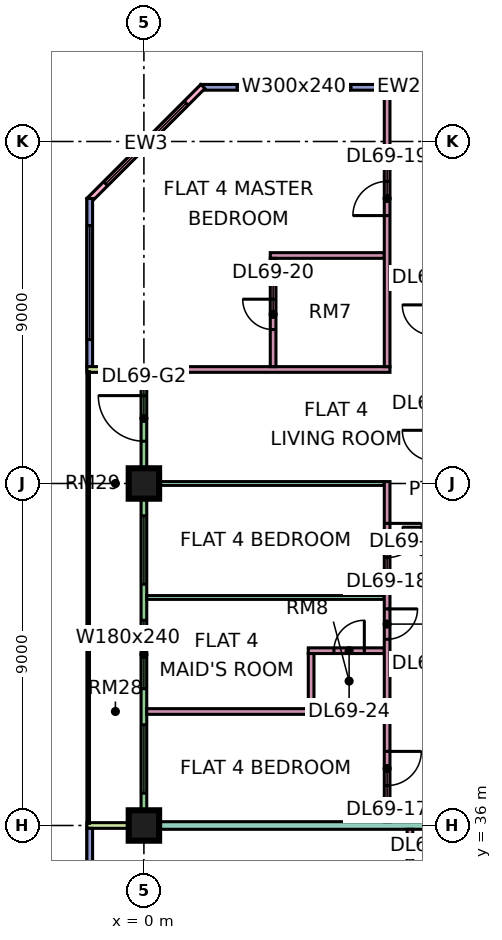
"""IFC4 building model, lengths in metres.
Left out: names, types, materials, properties, quantities, classifications, styles, units other than length and angle.
Written with IfcOpenShell. Run it as: python <this file> out.ifc"""

import sys

from ifc_helpers import new_model, si_unit, direction, frame, frame_2d, origin, origin_2d, place, context, subcontext, project, spatial, rectangle, extrude, element, fill, save


model = new_model("IFC4")
c1 = context("Model", 3, precision=1e-05, world=origin(), true_north=direction((0.0, 1.0)))
c2 = subcontext(c1, "Body", "Model", "MODEL_VIEW")
j1 = project(units=[si_unit("LENGTHUNIT", "METRE"), si_unit("PLANEANGLEUNIT", "RADIAN")], contexts=[c1])
p1 = place(None, origin())
s1 = spatial("IfcSite", under=j1, at=p1, CompositionType="ELEMENT")
p2 = place(p1, origin())
s2 = spatial("IfcBuilding", under=s1, at=p2, CompositionType="ELEMENT")
p3 = place(p2, frame((0.0, 0.0, 295.9)))
s3 = spatial("IfcBuildingStorey", under=s2, at=p3, CompositionType="ELEMENT", Elevation=295.9)
p4 = place(p3, frame((0.0, 36.0, 0.0), z_axis=(0.0, 0.0, 1.0), x_axis=(1.0, 0.0, 0.0)))
e1 = element("IfcColumn", 1, at=p4, inside=s3, PredefinedType="COLUMN", context=c2, shape_type="SweptSolid", body=[
    extrude(rectangle(XDim=0.8, YDim=0.8, at=origin_2d()), origin(), (0.0, 0.0, 1.0), 3.75),
])
p5 = place(p3, frame((0.0, 45.0, 0.0), z_axis=(0.0, 0.0, 1.0), x_axis=(1.0, 0.0, 0.0)))
e2 = element("IfcColumn", 2, at=p5, inside=s3, PredefinedType="COLUMN", context=c2, shape_type="SweptSolid", body=[
    extrude(rectangle(XDim=0.8, YDim=0.8, at=origin_2d()), origin(), (0.0, 0.0, 1.0), 3.75),
])
p6 = place(p3, frame((11.925, 55.425, 0.0), z_axis=(0.0, 0.0, 1.0), x_axis=(-1.0, 0.0, 0.0)))
e3 = element("IfcWall", 3, at=p6, inside=s3, PredefinedType="SOLIDWALL", context=c2, shape_type="SweptSolid", body=[
    extrude(rectangle(XDim=10.425, YDim=0.15, at=frame_2d((5.212, 0.0))), origin(), (0.0, 0.0, 1.0), 3.35),
])
p7 = place(p6, frame((1.262, 0.0, 0.45)))
e4 = element("IfcOpeningElement", 4, at=p7, cuts=e3, PredefinedType="OPENING", context=c2, shape_type="SweptSolid", body=[
    extrude(rectangle(XDim=3.0, YDim=2.4, at=frame_2d((1.5, 1.2))), frame((0.0, 0.085, 0.0), z_axis=(0.0, -1.0, 0.0), x_axis=(1.0, 0.0, 0.0)), (0.0, 0.0, 1.0), 0.17),
])
p8 = place(p6, frame((6.475, 0.0, 0.45)))
e5 = element("IfcOpeningElement", 5, at=p8, cuts=e3, PredefinedType="OPENING", context=c2, shape_type="SweptSolid", body=[
    extrude(rectangle(XDim=3.0, YDim=2.4, at=frame_2d((1.5, 1.2))), frame((0.0, 0.085, 0.0), z_axis=(0.0, -1.0, 0.0), x_axis=(1.0, 0.0, 0.0)), (0.0, 0.0, 1.0), 0.17),
])
p9 = place(p3, frame((1.553, 55.447, 0.0), z_axis=(0.0, 0.0, 1.0), x_axis=(-0.707106781187, -0.707106781187, 0.0)))
e6 = element("IfcWall", 6, at=p9, inside=s3, PredefinedType="SOLIDWALL", context=c2, shape_type="SweptSolid", body=[
    extrude(rectangle(XDim=4.243, YDim=0.15, at=frame_2d((2.121, 0.0))), origin(), (0.0, 0.0, 1.0), 3.35),
])
p10 = place(p9, frame((0.621, 0.0, 0.45)))
e7 = element("IfcOpeningElement", 7, at=p10, cuts=e6, PredefinedType="OPENING", context=c2, shape_type="SweptSolid", body=[
    extrude(rectangle(XDim=3.0, YDim=2.4, at=frame_2d((1.5, 1.2))), frame((0.0, 0.085, 0.0), z_axis=(0.0, -1.0, 0.0), x_axis=(1.0, 0.0, 0.0)), (0.0, 0.0, 1.0), 0.17),
])
p11 = place(p3, frame((-1.425, 52.5, 0.0), z_axis=(0.0, 0.0, 1.0), x_axis=(0.0, -1.0, 0.0)))
e8 = element("IfcWall", 8, at=p11, inside=s3, PredefinedType="SOLIDWALL", context=c2, shape_type="SweptSolid", body=[
    extrude(rectangle(XDim=4.425, YDim=0.15, at=frame_2d((2.212, 0.0))), origin(), (0.0, 0.0, 1.0), 3.35),
])
p12 = place(p11, frame((0.712, 0.0, 0.45)))
e9 = element("IfcOpeningElement", 9, at=p12, cuts=e8, PredefinedType="OPENING", context=c2, shape_type="SweptSolid", body=[
    extrude(rectangle(XDim=3.0, YDim=2.4, at=frame_2d((1.5, 1.2))), frame((0.0, 0.085, 0.0), z_axis=(0.0, -1.0, 0.0), x_axis=(1.0, 0.0, 0.0)), (0.0, 0.0, 1.0), 0.17),
])
p13 = place(p3, frame((0.0, 47.925, 0.0), z_axis=(0.0, 0.0, 1.0), x_axis=(0.0, -1.0, 0.0)))
e10 = element("IfcWall", 10, at=p13, inside=s3, PredefinedType="SOLIDWALL", context=c2, shape_type="SweptSolid", body=[
    extrude(rectangle(XDim=11.85, YDim=0.15, at=frame_2d((5.925, 0.0))), origin(), (0.0, 0.0, 1.0), 3.35),
])
p14 = place(p13, frame((0.613, 0.0, 0.0)))
e11 = element("IfcOpeningElement", 11, at=p14, cuts=e10, PredefinedType="OPENING", context=c2, shape_type="SweptSolid", body=[
    extrude(rectangle(XDim=1.2, YDim=2.4, at=frame_2d((0.6, 1.2))), frame((0.0, 0.085, 0.0), z_axis=(0.0, -1.0, 0.0), x_axis=(1.0, 0.0, 0.0)), (0.0, 0.0, 1.0), 0.17),
])
p15 = place(p13, frame((3.775, 0.0, 0.45)))
e12 = element("IfcOpeningElement", 12, at=p15, cuts=e10, PredefinedType="OPENING", context=c2, shape_type="SweptSolid", body=[
    extrude(rectangle(XDim=1.8, YDim=2.4, at=frame_2d((0.9, 1.2))), frame((0.0, 0.085, 0.0), z_axis=(0.0, -1.0, 0.0), x_axis=(1.0, 0.0, 0.0)), (0.0, 0.0, 1.0), 0.17),
])
p16 = place(p13, frame((6.525, 0.0, 0.45)))
e13 = element("IfcOpeningElement", 13, at=p16, cuts=e10, PredefinedType="OPENING", context=c2, shape_type="SweptSolid", body=[
    extrude(rectangle(XDim=1.8, YDim=2.4, at=frame_2d((0.9, 1.2))), frame((0.0, 0.085, 0.0), z_axis=(0.0, -1.0, 0.0), x_axis=(1.0, 0.0, 0.0)), (0.0, 0.0, 1.0), 0.17),
])
p17 = place(p13, frame((9.275, 0.0, 0.45)))
e14 = element("IfcOpeningElement", 14, at=p17, cuts=e10, PredefinedType="OPENING", context=c2, shape_type="SweptSolid", body=[
    extrude(rectangle(XDim=1.8, YDim=2.4, at=frame_2d((0.9, 1.2))), frame((0.0, 0.085, 0.0), z_axis=(0.0, -1.0, 0.0), x_axis=(1.0, 0.0, 0.0)), (0.0, 0.0, 1.0), 0.17),
])
for number, where, z_axis, x_axis in (
    (15, (-1.5, 48.0, 0.0), (0.0, 0.0, 1.0), (1.0, 0.0, 0.0)),
    (16, (-1.5, 36.0, 0.0), (0.0, 0.0, 1.0), (1.0, 0.0, 0.0)),
):
    element("IfcWall", number, at=place(p3, frame(where, z_axis=z_axis, x_axis=x_axis)), inside=s3, PredefinedType="SOLIDWALL", context=c2, shape_type="SweptSolid", body=[
        extrude(rectangle(XDim=1.5, YDim=0.15, at=frame_2d((0.75, 0.0))), origin(), (0.0, 0.0, 1.0), 3.35),
    ])
p18 = place(p3, frame((-1.425, 35.925, 0.0), z_axis=(0.0, 0.0, 1.0), x_axis=(0.0, -1.0, 0.0)))
e17 = element("IfcWall", 17, at=p18, inside=s3, PredefinedType="SOLIDWALL", context=c2, shape_type="SweptSolid", body=[
    extrude(rectangle(XDim=11.85, YDim=0.15, at=frame_2d((5.925, 0.0))), origin(), (0.0, 0.0, 1.0), 3.35),
])
p19 = place(p18, frame((1.462, 0.0, 0.45)))
e18 = element("IfcOpeningElement", 18, at=p19, cuts=e17, PredefinedType="OPENING", context=c2, shape_type="SweptSolid", body=[
    extrude(rectangle(XDim=3.0, YDim=2.4, at=frame_2d((1.5, 1.2))), frame((0.0, 0.085, 0.0), z_axis=(0.0, -1.0, 0.0), x_axis=(1.0, 0.0, 0.0)), (0.0, 0.0, 1.0), 0.17),
])
p20 = place(p18, frame((7.387, 0.0, 0.45)))
e19 = element("IfcOpeningElement", 19, at=p20, cuts=e17, PredefinedType="OPENING", context=c2, shape_type="SweptSolid", body=[
    extrude(rectangle(XDim=3.0, YDim=2.4, at=frame_2d((1.5, 1.2))), frame((0.0, 0.085, 0.0), z_axis=(0.0, -1.0, 0.0), x_axis=(1.0, 0.0, 0.0)), (0.0, 0.0, 1.0), 0.17),
])
e20 = element("IfcWall", 20, at=p4, inside=s3, PredefinedType="PARTITIONING", context=c2, shape_type="SweptSolid", body=[
    extrude(rectangle(XDim=12.3, YDim=0.2, at=frame_2d((6.15, 0.0))), origin(), (0.0, 0.0, 1.0), 3.35),
])
p21 = place(p3, frame((0.0, 48.0, 0.0), z_axis=(0.0, 0.0, 1.0), x_axis=(1.0, 0.0, 0.0)))
e21 = element("IfcWall", 21, at=p21, inside=s3, PredefinedType="PARTITIONING", context=c2, shape_type="SweptSolid", body=[
    extrude(rectangle(XDim=6.475, YDim=0.15, at=frame_2d((3.238, 0.0))), origin(), (0.0, 0.0, 1.0), 3.35),
])
p22 = place(p3, frame((0.074, 39.0, 0.0), z_axis=(0.0, 0.0, 1.0), x_axis=(1.0, 0.0, 0.0)))
e22 = element("IfcWall", 22, at=p22, inside=s3, PredefinedType="PARTITIONING", context=c2, shape_type="SweptSolid", body=[
    extrude(rectangle(XDim=6.251, YDim=0.15, at=frame_2d((3.125, 0.0))), origin(), (0.0, 0.0, 1.0), 3.35),
])
for number, where, z_axis, x_axis in (
    (23, (0.074, 42.0, 0.0), (0.0, 0.0, 1.0), (1.0, 0.0, 0.0)),
    (24, (0.074, 45.0, 0.0), (0.0, 0.0, 1.0), (1.0, 0.0, 0.0)),
):
    element("IfcWall", number, at=place(p3, frame(where, z_axis=z_axis, x_axis=x_axis)), inside=s3, PredefinedType="PARTITIONING", context=c2, shape_type="SweptSolid", body=[
        extrude(rectangle(XDim=6.251, YDim=0.1, at=frame_2d((3.125, 0.0))), origin(), (0.0, 0.0, 1.0), 3.35),
    ])
p23 = place(p3, frame((3.325, 51.0, 0.0), z_axis=(0.0, 0.0, 1.0), x_axis=(1.0, 0.0, 0.0)))
e25 = element("IfcWall", 25, at=p23, inside=s3, PredefinedType="PARTITIONING", context=c2, shape_type="SweptSolid", body=[
    extrude(rectangle(XDim=3.0, YDim=0.15, at=frame_2d((1.5, 0.0))), origin(), (0.0, 0.0, 1.0), 3.35),
])
p24 = place(p3, frame((3.4, 48.075, 0.0), z_axis=(0.0, 0.0, 1.0), x_axis=(0.0, 1.0, 0.0)))
e26 = element("IfcWall", 26, at=p24, inside=s3, PredefinedType="PARTITIONING", context=c2, shape_type="SweptSolid", body=[
    extrude(rectangle(XDim=2.85, YDim=0.15, at=frame_2d((1.425, 0.0))), origin(), (0.0, 0.0, 1.0), 3.35),
])
p25 = place(p24, frame((0.975, 0.0, 0.0)))
e27 = element("IfcOpeningElement", 27, at=p25, cuts=e26, PredefinedType="OPENING", context=c2, shape_type="SweptSolid", body=[
    extrude(rectangle(XDim=0.8, YDim=2.1, at=frame_2d((0.4, 1.05))), frame((0.0, 0.085, 0.0), z_axis=(0.0, -1.0, 0.0), x_axis=(1.0, 0.0, 0.0)), (0.0, 0.0, 1.0), 0.17),
])
p26 = place(p3, frame((4.325, 40.6, 0.0), z_axis=(0.0, 0.0, 1.0), x_axis=(1.0, 0.0, 0.0)))
e28 = element("IfcWall", 28, at=p26, inside=s3, PredefinedType="PARTITIONING", context=c2, shape_type="SweptSolid", body=[
    extrude(rectangle(XDim=2.0, YDim=0.15, at=frame_2d((1.0, 0.0))), origin(), (0.0, 0.0, 1.0), 3.35),
])
p27 = place(p26, frame((0.675, 0.0, 0.0)))
e29 = element("IfcOpeningElement", 29, at=p27, cuts=e28, PredefinedType="OPENING", context=c2, shape_type="SweptSolid", body=[
    extrude(rectangle(XDim=0.8, YDim=2.1, at=frame_2d((0.4, 1.05))), frame((0.0, 0.085, 0.0), z_axis=(0.0, -1.0, 0.0), x_axis=(1.0, 0.0, 0.0)), (0.0, 0.0, 1.0), 0.17),
])
p28 = place(p3, frame((4.4, 39.075, 0.0), z_axis=(0.0, 0.0, 1.0), x_axis=(0.0, 1.0, 0.0)))
e30 = element("IfcWall", 30, at=p28, inside=s3, PredefinedType="PARTITIONING", context=c2, shape_type="SweptSolid", body=[
    extrude(rectangle(XDim=1.45, YDim=0.15, at=frame_2d((0.725, 0.0))), origin(), (0.0, 0.0, 1.0), 3.35),
])
p29 = place(p3, frame((6.4, 36.1, 0.0), z_axis=(0.0, 0.0, 1.0), x_axis=(0.0, 1.0, 0.0)))
e31 = element("IfcWall", 31, at=p29, inside=s3, PredefinedType="PARTITIONING", context=c2, shape_type="SweptSolid", body=[
    extrude(rectangle(XDim=8.95, YDim=0.15, at=frame_2d((4.475, 0.0))), origin(), (0.0, 0.0, 1.0), 3.35),
])
p30 = place(p29, frame((0.95, 0.0, 0.0)))
e32 = element("IfcOpeningElement", 32, at=p30, cuts=e31, PredefinedType="OPENING", context=c2, shape_type="SweptSolid", body=[
    extrude(rectangle(XDim=0.9, YDim=2.1, at=frame_2d((0.45, 1.05))), frame((0.0, 0.085, 0.0), z_axis=(0.0, -1.0, 0.0), x_axis=(1.0, 0.0, 0.0)), (0.0, 0.0, 1.0), 0.17),
])
p31 = place(p29, frame((6.95, 0.0, 0.0)))
e33 = element("IfcOpeningElement", 33, at=p31, cuts=e31, PredefinedType="OPENING", context=c2, shape_type="SweptSolid", body=[
    extrude(rectangle(XDim=0.9, YDim=2.1, at=frame_2d((0.45, 1.05))), frame((0.0, 0.085, 0.0), z_axis=(0.0, -1.0, 0.0), x_axis=(1.0, 0.0, 0.0)), (0.0, 0.0, 1.0), 0.17),
])
p32 = place(p29, frame((4.8, 0.0, 0.0)))
e34 = element("IfcOpeningElement", 34, at=p32, cuts=e31, PredefinedType="OPENING", context=c2, shape_type="SweptSolid", body=[
    extrude(rectangle(XDim=0.8, YDim=2.1, at=frame_2d((0.4, 1.05))), frame((0.0, 0.085, 0.0), z_axis=(0.0, -1.0, 0.0), x_axis=(1.0, 0.0, 0.0)), (0.0, 0.0, 1.0), 0.17),
])
p33 = place(p3, frame((6.4, 48.075, 0.0), z_axis=(0.0, 0.0, 1.0), x_axis=(0.0, 1.0, 0.0)))
e35 = element("IfcWall", 35, at=p33, inside=s3, PredefinedType="PARTITIONING", context=c2, shape_type="SweptSolid", body=[
    extrude(rectangle(XDim=7.275, YDim=0.15, at=frame_2d((3.638, 0.0))), origin(), (0.0, 0.0, 1.0), 3.35),
])
p34 = place(p33, frame((3.975, 0.0, 0.0)))
e36 = element("IfcOpeningElement", 36, at=p34, cuts=e35, PredefinedType="OPENING", context=c2, shape_type="SweptSolid", body=[
    extrude(rectangle(XDim=0.9, YDim=2.1, at=frame_2d((0.45, 1.05))), frame((0.0, 0.085, 0.0), z_axis=(0.0, -1.0, 0.0), x_axis=(1.0, 0.0, 0.0)), (0.0, 0.0, 1.0), 0.17),
])
p35 = place(p3, frame((7.0, 30.075, 0.0), z_axis=(0.0, 0.0, 1.0), x_axis=(0.0, 1.0, 0.0)))
e37 = element("IfcWall", 37, at=p35, inside=s3, PredefinedType="PARTITIONING", context=c2, shape_type="SweptSolid", body=[
    extrude(rectangle(XDim=5.825, YDim=0.15, at=frame_2d((2.913, 0.0))), origin(), (0.0, 0.0, 1.0), 3.35),
])
p36 = place(p35, frame((3.975, 0.0, 0.0)))
e38 = element("IfcOpeningElement", 38, at=p36, cuts=e37, PredefinedType="OPENING", context=c2, shape_type="SweptSolid", body=[
    extrude(rectangle(XDim=0.9, YDim=2.1, at=frame_2d((0.45, 1.05))), frame((0.0, 0.085, 0.0), z_axis=(0.0, -1.0, 0.0), x_axis=(1.0, 0.0, 0.0)), (0.0, 0.0, 1.0), 0.17),
])
p37 = place(p8, origin())
e39 = element("IfcWindow", 39, at=p37, inside=s3, PartitioningType="SINGLE_PANEL", PredefinedType="WINDOW", context=c2, shape_type="SweptSolid", body=[
    extrude(rectangle(XDim=3.0, YDim=2.4, at=frame_2d((1.5, 1.2))), frame((0.0, 0.03, 0.0), z_axis=(0.0, -1.0, 0.0), x_axis=(1.0, 0.0, 0.0)), (0.0, 0.0, 1.0), 0.06),
])
fill(e5, e39)
p38 = place(p10, origin())
e40 = element("IfcWindow", 40, at=p38, inside=s3, PartitioningType="SINGLE_PANEL", PredefinedType="WINDOW", context=c2, shape_type="SweptSolid", body=[
    extrude(rectangle(XDim=3.0, YDim=2.4, at=frame_2d((1.5, 1.2))), frame((0.0, 0.03, 0.0), z_axis=(0.0, -1.0, 0.0), x_axis=(1.0, 0.0, 0.0)), (0.0, 0.0, 1.0), 0.06),
])
fill(e7, e40)
p39 = place(p12, origin())
e41 = element("IfcWindow", 41, at=p39, inside=s3, PartitioningType="SINGLE_PANEL", PredefinedType="WINDOW", context=c2, shape_type="SweptSolid", body=[
    extrude(rectangle(XDim=3.0, YDim=2.4, at=frame_2d((1.5, 1.2))), frame((0.0, 0.03, 0.0), z_axis=(0.0, -1.0, 0.0), x_axis=(1.0, 0.0, 0.0)), (0.0, 0.0, 1.0), 0.06),
])
fill(e9, e41)
p40 = place(p14, frame((1.2, 0.0, 0.0), z_axis=(0.0, 0.0, 1.0), x_axis=(-1.0, 0.0, 0.0)))
e42 = element("IfcDoor", 42, at=p40, inside=s3, OperationType="DOUBLE_DOOR_SINGLE_SWING", PredefinedType="DOOR", context=c2, shape_type="SweptSolid", body=[
    extrude(rectangle(XDim=1.2, YDim=2.4, at=frame_2d((0.6, 1.2))), frame((0.0, 0.025, 0.0), z_axis=(0.0, -1.0, 0.0), x_axis=(1.0, 0.0, 0.0)), (0.0, 0.0, 1.0), 0.05),
])
fill(e11, e42)
p41 = place(p15, origin())
e43 = element("IfcWindow", 43, at=p41, inside=s3, PartitioningType="SINGLE_PANEL", PredefinedType="WINDOW", context=c2, shape_type="SweptSolid", body=[
    extrude(rectangle(XDim=1.8, YDim=2.4, at=frame_2d((0.9, 1.2))), frame((0.0, 0.03, 0.0), z_axis=(0.0, -1.0, 0.0), x_axis=(1.0, 0.0, 0.0)), (0.0, 0.0, 1.0), 0.06),
])
fill(e12, e43)
p42 = place(p16, origin())
e44 = element("IfcWindow", 44, at=p42, inside=s3, PartitioningType="SINGLE_PANEL", PredefinedType="WINDOW", context=c2, shape_type="SweptSolid", body=[
    extrude(rectangle(XDim=1.8, YDim=2.4, at=frame_2d((0.9, 1.2))), frame((0.0, 0.03, 0.0), z_axis=(0.0, -1.0, 0.0), x_axis=(1.0, 0.0, 0.0)), (0.0, 0.0, 1.0), 0.06),
])
fill(e13, e44)
p43 = place(p17, origin())
e45 = element("IfcWindow", 45, at=p43, inside=s3, PartitioningType="SINGLE_PANEL", PredefinedType="WINDOW", context=c2, shape_type="SweptSolid", body=[
    extrude(rectangle(XDim=1.8, YDim=2.4, at=frame_2d((0.9, 1.2))), frame((0.0, 0.03, 0.0), z_axis=(0.0, -1.0, 0.0), x_axis=(1.0, 0.0, 0.0)), (0.0, 0.0, 1.0), 0.06),
])
fill(e14, e45)
p44 = place(p30, origin())
e46 = element("IfcDoor", 46, at=p44, inside=s3, OperationType="SINGLE_SWING_RIGHT", PredefinedType="DOOR", context=c2, shape_type="SweptSolid", body=[
    extrude(rectangle(XDim=0.9, YDim=2.1, at=frame_2d((0.45, 1.05))), frame((0.0, 0.025, 0.0), z_axis=(0.0, -1.0, 0.0), x_axis=(1.0, 0.0, 0.0)), (0.0, 0.0, 1.0), 0.05),
])
fill(e32, e46)
p45 = place(p31, origin())
e47 = element("IfcDoor", 47, at=p45, inside=s3, OperationType="SINGLE_SWING_RIGHT", PredefinedType="DOOR", context=c2, shape_type="SweptSolid", body=[
    extrude(rectangle(XDim=0.9, YDim=2.1, at=frame_2d((0.45, 1.05))), frame((0.0, 0.025, 0.0), z_axis=(0.0, -1.0, 0.0), x_axis=(1.0, 0.0, 0.0)), (0.0, 0.0, 1.0), 0.05),
])
fill(e33, e47)
p46 = place(p34, origin())
e48 = element("IfcDoor", 48, at=p46, inside=s3, OperationType="SINGLE_SWING_LEFT", PredefinedType="DOOR", context=c2, shape_type="SweptSolid", body=[
    extrude(rectangle(XDim=0.9, YDim=2.1, at=frame_2d((0.45, 1.05))), frame((0.0, 0.025, 0.0), z_axis=(0.0, -1.0, 0.0), x_axis=(1.0, 0.0, 0.0)), (0.0, 0.0, 1.0), 0.05),
])
fill(e36, e48)
p47 = place(p25, frame((0.8, 0.0, 0.0), z_axis=(0.0, 0.0, 1.0), x_axis=(-1.0, 0.0, 0.0)))
e49 = element("IfcDoor", 49, at=p47, inside=s3, OperationType="SINGLE_SWING_RIGHT", PredefinedType="DOOR", context=c2, shape_type="SweptSolid", body=[
    extrude(rectangle(XDim=0.8, YDim=2.1, at=frame_2d((0.4, 1.05))), frame((0.0, 0.025, 0.0), z_axis=(0.0, -1.0, 0.0), x_axis=(1.0, 0.0, 0.0)), (0.0, 0.0, 1.0), 0.05),
])
fill(e27, e49)
p48 = place(p32, origin())
e50 = element("IfcDoor", 50, at=p48, inside=s3, OperationType="SINGLE_SWING_RIGHT", PredefinedType="DOOR", context=c2, shape_type="SweptSolid", body=[
    extrude(rectangle(XDim=0.8, YDim=2.1, at=frame_2d((0.4, 1.05))), frame((0.0, 0.025, 0.0), z_axis=(0.0, -1.0, 0.0), x_axis=(1.0, 0.0, 0.0)), (0.0, 0.0, 1.0), 0.05),
])
fill(e34, e50)
p49 = place(p27, frame((0.8, 0.0, 0.0), z_axis=(0.0, 0.0, 1.0), x_axis=(-1.0, 0.0, 0.0)))
e51 = element("IfcDoor", 51, at=p49, inside=s3, OperationType="SINGLE_SWING_RIGHT", PredefinedType="DOOR", context=c2, shape_type="SweptSolid", body=[
    extrude(rectangle(XDim=0.8, YDim=2.1, at=frame_2d((0.4, 1.05))), frame((0.0, 0.025, 0.0), z_axis=(0.0, -1.0, 0.0), x_axis=(1.0, 0.0, 0.0)), (0.0, 0.0, 1.0), 0.05),
])
fill(e29, e51)
save(model, sys.argv[1])
